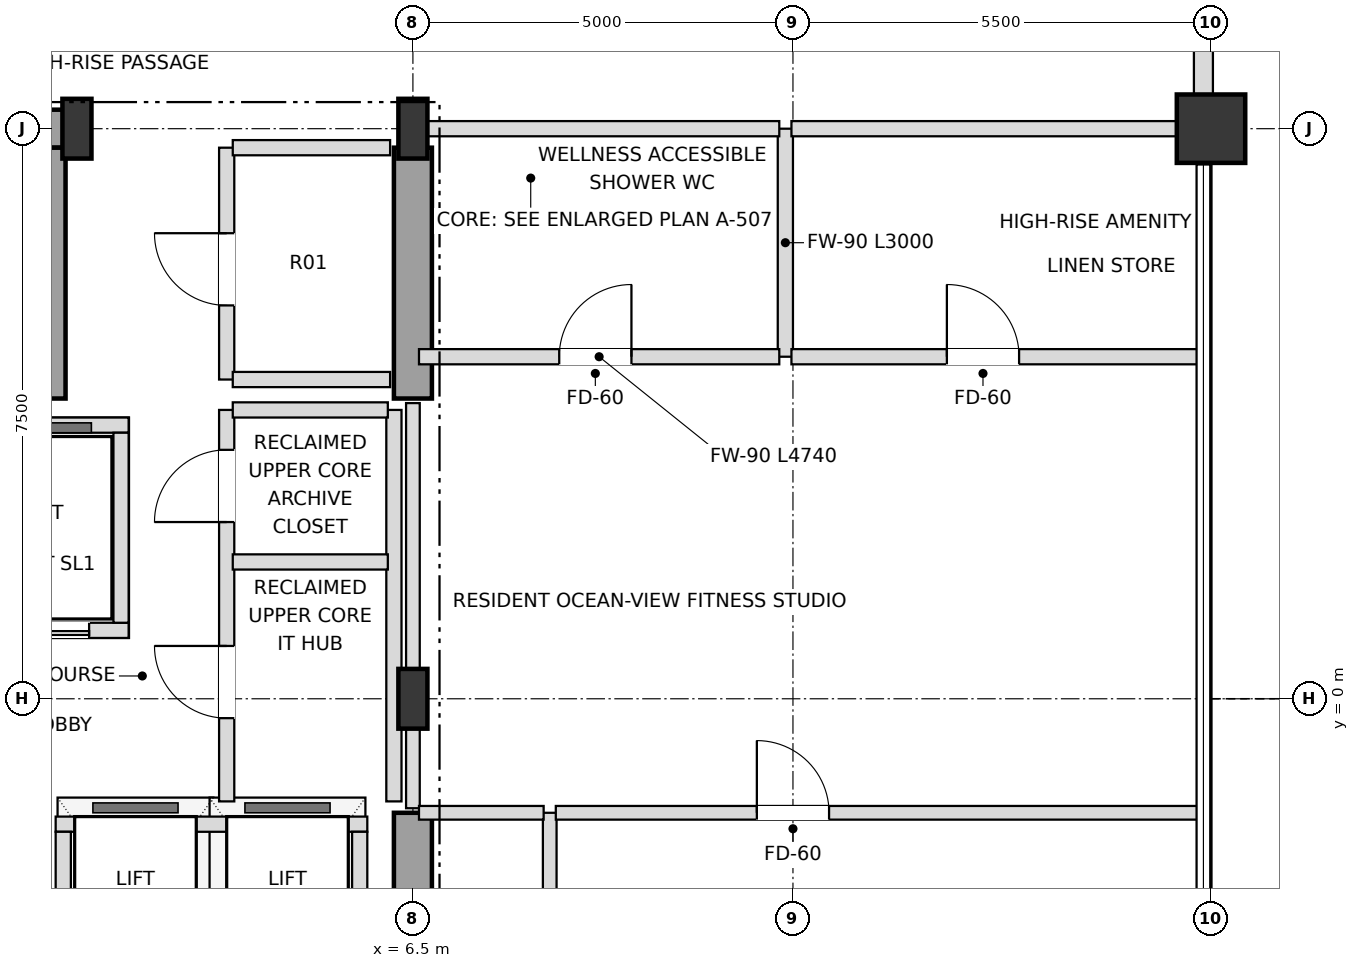
"""IFC4 building model, lengths in metres.
Left out: names, types, materials, properties, quantities, classifications, styles, units other than length and angle.
Written with IfcOpenShell. Run it as: python <this file> out.ifc"""

import sys

from ifc_helpers import new_model, si_unit, direction, frame, frame_2d, origin, origin_2d, place, context, subcontext, project, spatial, rectangle, i_section, extrude, element, fill, save


model = new_model("IFC4")
c1 = context("Model", 3, precision=1e-05, world=origin(), true_north=direction((0.0, 1.0)))
c2 = subcontext(c1, "Body", "Model", "MODEL_VIEW")
j1 = project(units=[si_unit("LENGTHUNIT", "METRE"), si_unit("PLANEANGLEUNIT", "RADIAN")], contexts=[c1])
p1 = place(None, origin())
s1 = spatial("IfcSite", under=j1, at=p1, CompositionType="ELEMENT")
p2 = place(p1, origin())
s2 = spatial("IfcBuilding", under=s1, at=p2, CompositionType="ELEMENT")
p3 = place(p2, frame((0.0, 0.0, 272.7)))
s3 = spatial("IfcBuildingStorey", under=s2, at=p3, CompositionType="ELEMENT", Elevation=272.7)
for number, where, z_axis, x_axis in (
    (1, (6.5, 0.0, 0.0), (0.0, 0.0, 1.0), (1.0, 0.0, 0.0)),
    (2, (2.08, 7.5, 0.0), (0.0, 0.0, 1.0), (1.0, 0.0, 0.0)),
    (3, (6.5, 7.5, 0.0), (0.0, 0.0, 1.0), (1.0, 0.0, 0.0)),
):
    element("IfcColumn", number, at=place(p3, frame(where, z_axis=z_axis, x_axis=x_axis)), inside=s3, PredefinedType="COLUMN", context=c2, shape_type="SweptSolid", body=[
        extrude(i_section(OverallWidth=0.382, OverallDepth=0.786, WebThickness=0.02, FlangeThickness=0.033, at=origin_2d()), origin(), (0.0, 0.0, 1.0), 3.6),
    ])
p4 = place(p3, frame((17.0, 7.5, 0.0), z_axis=(0.0, 0.0, 1.0), x_axis=(1.0, 0.0, 0.0)))
e4 = element("IfcColumn", 4, at=p4, inside=s3, PredefinedType="USERDEFINED", context=c2, shape_type="SweptSolid", body=[
    extrude(rectangle(XDim=0.9, YDim=0.9, at=origin_2d()), origin(), (0.0, 0.0, 1.0), 3.6),
])
p5 = place(p3, frame((16.9, 7.945, 0.0), z_axis=(0.0, 0.0, 1.0), x_axis=(0.0, 1.0, 0.0)))
e5 = element("IfcWall", 5, at=p5, inside=s3, PredefinedType="SOLIDWALL", context=c2, shape_type="SweptSolid", body=[
    extrude(rectangle(XDim=4.61, YDim=0.25, at=frame_2d((2.305, 0.0))), origin(), (0.0, 0.0, 1.0), 2.748),
])
p6 = place(p5, frame((1.405, 0.0, 0.72)))
e6 = element("IfcOpeningElement", 6, at=p6, cuts=e5, PredefinedType="OPENING", context=c2, shape_type="SweptSolid", body=[
    extrude(rectangle(XDim=1.8, YDim=1.68, at=frame_2d((0.9, 0.84))), frame((0.0, 0.135, 0.0), z_axis=(0.0, -1.0, 0.0), x_axis=(1.0, 0.0, 0.0)), (0.0, 0.0, 1.0), 0.27),
])
p7 = place(p3, frame((0.0, 7.5, 0.0), z_axis=(0.0, 0.0, 1.0), x_axis=(1.0, 0.0, 0.0)))
e7 = element("IfcWall", 7, at=p7, inside=s3, PredefinedType="SHEAR", context=c2, shape_type="SweptSolid", body=[
    extrude(rectangle(XDim=2.08, YDim=0.5, at=frame_2d((1.04, 0.0))), origin(), (0.0, 0.0, 1.0), 3.38),
])
p8 = place(p3, frame((6.5, -7.25, 0.0), z_axis=(0.0, 0.0, 1.0), x_axis=(0.0, 1.0, 0.0)))
e8 = element("IfcWall", 8, at=p8, inside=s3, PredefinedType="SHEAR", context=c2, shape_type="SweptSolid", body=[
    extrude(rectangle(XDim=5.75, YDim=0.5, at=frame_2d((2.875, 0.0))), origin(), (0.0, 0.0, 1.0), 3.38),
])
p9 = place(p8, frame((0.85, 0.0, 0.0)))
e9 = element("IfcOpeningElement", 9, at=p9, cuts=e8, PredefinedType="OPENING", context=c2, shape_type="SweptSolid", body=[
    extrude(rectangle(XDim=1.05, YDim=2.15, at=frame_2d((0.525, 1.075))), frame((0.0, 0.26, 0.0), z_axis=(0.0, -1.0, 0.0), x_axis=(1.0, 0.0, 0.0)), (0.0, 0.0, 1.0), 0.52),
])
p10 = place(p3, frame((6.5, 3.95, 0.0), z_axis=(0.0, 0.0, 1.0), x_axis=(0.0, 1.0, 0.0)))
e10 = element("IfcWall", 10, at=p10, inside=s3, PredefinedType="SHEAR", context=c2, shape_type="SweptSolid", body=[
    extrude(rectangle(XDim=3.3, YDim=0.5, at=frame_2d((1.65, 0.0))), origin(), (0.0, 0.0, 1.0), 3.38),
])
p11 = place(p3, frame((1.73, 3.95, 0.0), z_axis=(0.0, 0.0, 1.0), x_axis=(0.0, 1.0, 0.0)))
e11 = element("IfcWall", 11, at=p11, inside=s3, PredefinedType="SHEAR", context=c2, shape_type="SweptSolid", body=[
    extrude(rectangle(XDim=3.3, YDim=0.4, at=frame_2d((1.65, 0.0))), origin(), (0.0, 0.0, 1.0), 3.38),
])
p12 = place(p3, frame((-2.82, 0.9, 0.0), z_axis=(0.0, 0.0, 1.0), x_axis=(1.0, 0.0, 0.0)))
e12 = element("IfcWall", 12, at=p12, inside=s3, PredefinedType="SOLIDWALL", context=c2, shape_type="SweptSolid", body=[
    extrude(rectangle(XDim=5.58, YDim=0.2, at=frame_2d((2.79, 0.0))), origin(), (0.0, 0.0, 1.0), 3.38),
])
p13 = place(p12, frame((0.49, 0.0, 0.0)))
e13 = element("IfcOpeningElement", 13, at=p13, cuts=e12, PredefinedType="OPENING", context=c2, shape_type="SweptSolid", body=[
    extrude(rectangle(XDim=1.1, YDim=2.15, at=frame_2d((0.55, 1.075))), frame((0.0, 0.11, 0.0), z_axis=(0.0, -1.0, 0.0), x_axis=(1.0, 0.0, 0.0)), (0.0, 0.0, 1.0), 0.22),
])
p14 = place(p12, frame((2.17, 0.0, 0.0)))
e14 = element("IfcOpeningElement", 14, at=p14, cuts=e12, PredefinedType="OPENING", context=c2, shape_type="SweptSolid", body=[
    extrude(rectangle(XDim=1.1, YDim=2.15, at=frame_2d((0.55, 1.075))), frame((0.0, 0.11, 0.0), z_axis=(0.0, -1.0, 0.0), x_axis=(1.0, 0.0, 0.0)), (0.0, 0.0, 1.0), 0.22),
])
p15 = place(p12, frame((3.86, 0.0, 0.0)))
e15 = element("IfcOpeningElement", 15, at=p15, cuts=e12, PredefinedType="OPENING", context=c2, shape_type="SweptSolid", body=[
    extrude(rectangle(XDim=1.2, YDim=2.2, at=frame_2d((0.6, 1.1))), frame((0.0, 0.11, 0.0), z_axis=(0.0, -1.0, 0.0), x_axis=(1.0, 0.0, 0.0)), (0.0, 0.0, 1.0), 0.22),
])
p16 = place(p3, frame((-2.82, 3.6, 0.0), z_axis=(0.0, 0.0, 1.0), x_axis=(1.0, 0.0, 0.0)))
e16 = element("IfcWall", 16, at=p16, inside=s3, PredefinedType="SOLIDWALL", context=c2, shape_type="SweptSolid", body=[
    extrude(rectangle(XDim=5.58, YDim=0.2, at=frame_2d((2.79, 0.0))), origin(), (0.0, 0.0, 1.0), 3.38),
])
p17 = place(p3, frame((2.66, 1.0, 0.0), z_axis=(0.0, 0.0, 1.0), x_axis=(0.0, 1.0, 0.0)))
e17 = element("IfcWall", 17, at=p17, inside=s3, PredefinedType="SOLIDWALL", context=c2, shape_type="SweptSolid", body=[
    extrude(rectangle(XDim=2.5, YDim=0.2, at=frame_2d((1.25, 0.0))), origin(), (0.0, 0.0, 1.0), 3.38),
])
p18 = place(p3, frame((1.8, -1.65, 0.0), z_axis=(0.0, 0.0, 1.0), x_axis=(1.0, 0.0, 0.0)))
e18 = element("IfcWall", 18, at=p18, inside=s3, PredefinedType="SOLIDWALL", context=c2, shape_type="SweptSolid", body=[
    extrude(rectangle(XDim=4.1, YDim=0.2, at=frame_2d((2.05, 0.0))), origin(), (0.0, 0.0, 1.0), 3.38),
])
for number, where, z_axis, x_axis in (
    (19, (1.9, -3.75, 0.0), (0.0, 0.0, 1.0), (0.0, 1.0, 0.0)),
    (20, (5.8, -3.75, 0.0), (0.0, 0.0, 1.0), (0.0, 1.0, 0.0)),
):
    element("IfcWall", number, at=place(p3, frame(where, z_axis=z_axis, x_axis=x_axis)), inside=s3, PredefinedType="SOLIDWALL", context=c2, shape_type="SweptSolid", body=[
        extrude(rectangle(XDim=2.0, YDim=0.2, at=frame_2d((1.0, 0.0))), origin(), (0.0, 0.0, 1.0), 3.38),
    ])
p19 = place(p3, frame((4.05, -1.35, 0.0), z_axis=(0.0, 0.0, 1.0), x_axis=(0.0, 1.0, 0.0)))
e21 = element("IfcWall", 21, at=p19, inside=s3, PredefinedType="SOLIDWALL", context=c2, shape_type="SweptSolid", body=[
    extrude(rectangle(XDim=5.15, YDim=0.2, at=frame_2d((2.575, 0.0))), origin(), (0.0, 0.0, 1.0), 3.38),
])
p20 = place(p19, frame((1.095, 0.0, 0.0)))
e22 = element("IfcOpeningElement", 22, at=p20, cuts=e21, PredefinedType="OPENING", context=c2, shape_type="SweptSolid", body=[
    extrude(rectangle(XDim=0.95, YDim=2.15, at=frame_2d((0.475, 1.075))), frame((0.0, 0.11, 0.0), z_axis=(0.0, -1.0, 0.0), x_axis=(1.0, 0.0, 0.0)), (0.0, 0.0, 1.0), 0.22),
])
p21 = place(p19, frame((3.675, 0.0, 0.0)))
e23 = element("IfcOpeningElement", 23, at=p21, cuts=e21, PredefinedType="OPENING", context=c2, shape_type="SweptSolid", body=[
    extrude(rectangle(XDim=0.95, YDim=2.15, at=frame_2d((0.475, 1.075))), frame((0.0, 0.11, 0.0), z_axis=(0.0, -1.0, 0.0), x_axis=(1.0, 0.0, 0.0)), (0.0, 0.0, 1.0), 0.22),
])
p22 = place(p3, frame((4.05, 4.2, 0.0), z_axis=(0.0, 0.0, 1.0), x_axis=(0.0, 1.0, 0.0)))
e24 = element("IfcWall", 24, at=p22, inside=s3, PredefinedType="SOLIDWALL", context=c2, shape_type="SweptSolid", body=[
    extrude(rectangle(XDim=3.05, YDim=0.2, at=frame_2d((1.525, 0.0))), origin(), (0.0, 0.0, 1.0), 3.38),
])
p23 = place(p22, frame((0.975, 0.0, 0.0)))
e25 = element("IfcOpeningElement", 25, at=p23, cuts=e24, PredefinedType="OPENING", context=c2, shape_type="SweptSolid", body=[
    extrude(rectangle(XDim=0.95, YDim=2.15, at=frame_2d((0.475, 1.075))), frame((0.0, 0.11, 0.0), z_axis=(0.0, -1.0, 0.0), x_axis=(1.0, 0.0, 0.0)), (0.0, 0.0, 1.0), 0.22),
])
p24 = place(p3, frame((6.25, -1.35, 0.0), z_axis=(0.0, 0.0, 1.0), x_axis=(0.0, 1.0, 0.0)))
e26 = element("IfcWall", 26, at=p24, inside=s3, PredefinedType="SOLIDWALL", context=c2, shape_type="SweptSolid", body=[
    extrude(rectangle(XDim=5.15, YDim=0.2, at=frame_2d((2.575, 0.0))), origin(), (0.0, 0.0, 1.0), 3.38),
])
p25 = place(p3, frame((6.5, -1.44, 0.0), z_axis=(0.0, 0.0, 1.0), x_axis=(0.0, 1.0, 0.0)))
e27 = element("IfcWall", 27, at=p25, inside=s3, PredefinedType="PARTITIONING", context=c2, shape_type="SweptSolid", body=[
    extrude(rectangle(XDim=5.33, YDim=0.18, at=frame_2d((2.665, 0.0))), origin(), (0.0, 0.0, 1.0), 2.826),
])
p26 = place(p3, frame((8.3, -7.5, 0.0), z_axis=(0.0, 0.0, 1.0), x_axis=(0.0, 1.0, 0.0)))
e28 = element("IfcWall", 28, at=p26, inside=s3, PredefinedType="PARTITIONING", context=c2, shape_type="SweptSolid", body=[
    extrude(rectangle(XDim=6.0, YDim=0.18, at=frame_2d((3.0, 0.0))), origin(), (0.0, 0.0, 1.0), 3.38),
])
p27 = place(p26, frame((1.425, 0.0, 0.0)))
e29 = element("IfcOpeningElement", 29, at=p27, cuts=e28, PredefinedType="OPENING", context=c2, shape_type="SweptSolid", body=[
    extrude(rectangle(XDim=0.95, YDim=2.15, at=frame_2d((0.475, 1.075))), frame((0.0, 0.1, 0.0), z_axis=(0.0, -1.0, 0.0), x_axis=(1.0, 0.0, 0.0)), (0.0, 0.0, 1.0), 0.2),
])
p28 = place(p3, frame((11.4, 4.5, 0.0), z_axis=(0.0, 0.0, 1.0), x_axis=(0.0, 1.0, 0.0)))
e30 = element("IfcWall", 30, at=p28, inside=s3, PredefinedType="SOLIDWALL", context=c2, shape_type="SweptSolid", body=[
    extrude(rectangle(XDim=3.0, YDim=0.2, at=frame_2d((1.5, 0.0))), origin(), (0.0, 0.0, 1.0), 3.018),
])
p29 = place(p3, frame((6.58, -1.5, 0.0), z_axis=(0.0, 0.0, 1.0), x_axis=(1.0, 0.0, 0.0)))
e31 = element("IfcWall", 31, at=p29, inside=s3, PredefinedType="PARTITIONING", context=c2, shape_type="SweptSolid", body=[
    extrude(rectangle(XDim=1.64, YDim=0.18, at=frame_2d((0.82, 0.0))), origin(), (0.0, 0.0, 1.0), 3.38),
])
p30 = place(p3, frame((8.38, -1.5, 0.0), z_axis=(0.0, 0.0, 1.0), x_axis=(1.0, 0.0, 0.0)))
e32 = element("IfcWall", 32, at=p30, inside=s3, PredefinedType="PARTITIONING", context=c2, shape_type="SweptSolid", body=[
    extrude(rectangle(XDim=8.44, YDim=0.18, at=frame_2d((4.22, 0.0))), origin(), (0.0, 0.0, 1.0), 3.018),
])
p31 = place(p30, frame((2.645, 0.0, 0.0)))
e33 = element("IfcOpeningElement", 33, at=p31, cuts=e32, PredefinedType="OPENING", context=c2, shape_type="SweptSolid", body=[
    extrude(rectangle(XDim=0.95, YDim=2.15, at=frame_2d((0.475, 1.075))), frame((0.0, 0.1, 0.0), z_axis=(0.0, -1.0, 0.0), x_axis=(1.0, 0.0, 0.0)), (0.0, 0.0, 1.0), 0.2),
])
for number, where, z_axis, x_axis in (
    (34, (4.13, 1.8, 0.0), (0.0, 0.0, 1.0), (1.0, 0.0, 0.0)),
    (35, (4.13, 3.8, 0.0), (0.0, 0.0, 1.0), (1.0, 0.0, 0.0)),
):
    element("IfcWall", number, at=place(p3, frame(where, z_axis=z_axis, x_axis=x_axis)), inside=s3, PredefinedType="SOLIDWALL", context=c2, shape_type="SweptSolid", body=[
        extrude(rectangle(XDim=2.04, YDim=0.2, at=frame_2d((1.02, 0.0))), origin(), (0.0, 0.0, 1.0), 3.38),
    ])
p32 = place(p3, frame((4.13, 4.2, 0.0), z_axis=(0.0, 0.0, 1.0), x_axis=(1.0, 0.0, 0.0)))
e36 = element("IfcWall", 36, at=p32, inside=s3, PredefinedType="SOLIDWALL", context=c2, shape_type="SweptSolid", body=[
    extrude(rectangle(XDim=2.07, YDim=0.2, at=frame_2d((1.035, 0.0))), origin(), (0.0, 0.0, 1.0), 3.38),
])
p33 = place(p3, frame((6.58, 4.5, 0.0), z_axis=(0.0, 0.0, 1.0), x_axis=(1.0, 0.0, 0.0)))
e37 = element("IfcWall", 37, at=p33, inside=s3, PredefinedType="SOLIDWALL", context=c2, shape_type="SweptSolid", body=[
    extrude(rectangle(XDim=4.74, YDim=0.2, at=frame_2d((2.37, 0.0))), origin(), (0.0, 0.0, 1.0), 3.38),
])
p34 = place(p33, frame((1.845, 0.0, 0.0)))
e38 = element("IfcOpeningElement", 38, at=p34, cuts=e37, PredefinedType="OPENING", context=c2, shape_type="SweptSolid", body=[
    extrude(rectangle(XDim=0.95, YDim=2.15, at=frame_2d((0.475, 1.075))), frame((0.0, 0.11, 0.0), z_axis=(0.0, -1.0, 0.0), x_axis=(1.0, 0.0, 0.0)), (0.0, 0.0, 1.0), 0.22),
])
p35 = place(p3, frame((11.48, 4.5, 0.0), z_axis=(0.0, 0.0, 1.0), x_axis=(1.0, 0.0, 0.0)))
e39 = element("IfcWall", 39, at=p35, inside=s3, PredefinedType="SOLIDWALL", context=c2, shape_type="SweptSolid", body=[
    extrude(rectangle(XDim=5.34, YDim=0.2, at=frame_2d((2.67, 0.0))), origin(), (0.0, 0.0, 1.0), 3.38),
])
p36 = place(p35, frame((2.045, 0.0, 0.0)))
e40 = element("IfcOpeningElement", 40, at=p36, cuts=e39, PredefinedType="OPENING", context=c2, shape_type="SweptSolid", body=[
    extrude(rectangle(XDim=0.95, YDim=2.15, at=frame_2d((0.475, 1.075))), frame((0.0, 0.11, 0.0), z_axis=(0.0, -1.0, 0.0), x_axis=(1.0, 0.0, 0.0)), (0.0, 0.0, 1.0), 0.22),
])
p37 = place(p3, frame((4.13, 7.25, 0.0), z_axis=(0.0, 0.0, 1.0), x_axis=(1.0, 0.0, 0.0)))
e41 = element("IfcWall", 41, at=p37, inside=s3, PredefinedType="SOLIDWALL", context=c2, shape_type="SweptSolid", body=[
    extrude(rectangle(XDim=2.07, YDim=0.2, at=frame_2d((1.035, 0.0))), origin(), (0.0, 0.0, 1.0), 3.38),
])
p38 = place(p3, frame((6.5, 7.5, 0.0), z_axis=(0.0, 0.0, 1.0), x_axis=(1.0, 0.0, 0.0)))
e42 = element("IfcWall", 42, at=p38, inside=s3, PredefinedType="SOLIDWALL", context=c2, shape_type="SweptSolid", body=[
    extrude(rectangle(XDim=4.82, YDim=0.2, at=frame_2d((2.41, 0.0))), origin(), (0.0, 0.0, 1.0), 2.826),
])
p39 = place(p3, frame((11.48, 7.5, 0.0), z_axis=(0.0, 0.0, 1.0), x_axis=(1.0, 0.0, 0.0)))
e43 = element("IfcWall", 43, at=p39, inside=s3, PredefinedType="SOLIDWALL", context=c2, shape_type="SweptSolid", body=[
    extrude(rectangle(XDim=5.42, YDim=0.2, at=frame_2d((2.71, 0.0))), origin(), (0.0, 0.0, 1.0), 2.826),
])
p40 = place(p15, origin())
e44 = element("IfcDoor", 44, at=p40, inside=s3, OperationType="DOUBLE_DOOR_SLIDING", PredefinedType="DOOR", context=c2, shape_type="SweptSolid", body=[
    extrude(rectangle(XDim=1.2, YDim=2.2, at=frame_2d((0.6, 1.1))), frame((0.0, 0.025, 0.0), z_axis=(0.0, -1.0, 0.0), x_axis=(1.0, 0.0, 0.0)), (0.0, 0.0, 1.0), 0.05),
])
fill(e15, e44)
p41 = place(p20, origin())
e45 = element("IfcDoor", 45, at=p41, inside=s3, OperationType="SINGLE_SWING_RIGHT", PredefinedType="DOOR", context=c2, shape_type="SweptSolid", body=[
    extrude(rectangle(XDim=0.95, YDim=2.15, at=frame_2d((0.475, 1.075))), frame((0.0, 0.025, 0.0), z_axis=(0.0, -1.0, 0.0), x_axis=(1.0, 0.0, 0.0)), (0.0, 0.0, 1.0), 0.05),
])
fill(e22, e45)
p42 = place(p21, origin())
e46 = element("IfcDoor", 46, at=p42, inside=s3, OperationType="SINGLE_SWING_LEFT", PredefinedType="DOOR", context=c2, shape_type="SweptSolid", body=[
    extrude(rectangle(XDim=0.95, YDim=2.15, at=frame_2d((0.475, 1.075))), frame((0.0, 0.025, 0.0), z_axis=(0.0, -1.0, 0.0), x_axis=(1.0, 0.0, 0.0)), (0.0, 0.0, 1.0), 0.05),
])
fill(e23, e46)
p43 = place(p23, origin())
e47 = element("IfcDoor", 47, at=p43, inside=s3, OperationType="SINGLE_SWING_RIGHT", PredefinedType="DOOR", context=c2, shape_type="SweptSolid", body=[
    extrude(rectangle(XDim=0.95, YDim=2.15, at=frame_2d((0.475, 1.075))), frame((0.0, 0.025, 0.0), z_axis=(0.0, -1.0, 0.0), x_axis=(1.0, 0.0, 0.0)), (0.0, 0.0, 1.0), 0.05),
])
fill(e25, e47)
p44 = place(p31, origin())
e48 = element("IfcDoor", 48, at=p44, inside=s3, OperationType="SINGLE_SWING_LEFT", PredefinedType="DOOR", context=c2, shape_type="SweptSolid", body=[
    extrude(rectangle(XDim=0.95, YDim=2.15, at=frame_2d((0.475, 1.075))), frame((0.0, 0.025, 0.0), z_axis=(0.0, -1.0, 0.0), x_axis=(1.0, 0.0, 0.0)), (0.0, 0.0, 1.0), 0.05),
])
fill(e33, e48)
p45 = place(p34, origin())
e49 = element("IfcDoor", 49, at=p45, inside=s3, OperationType="SINGLE_SWING_RIGHT", PredefinedType="DOOR", context=c2, shape_type="SweptSolid", body=[
    extrude(rectangle(XDim=0.95, YDim=2.15, at=frame_2d((0.475, 1.075))), frame((0.0, 0.025, 0.0), z_axis=(0.0, -1.0, 0.0), x_axis=(1.0, 0.0, 0.0)), (0.0, 0.0, 1.0), 0.05),
])
fill(e38, e49)
p46 = place(p36, origin())
e50 = element("IfcDoor", 50, at=p46, inside=s3, OperationType="SINGLE_SWING_LEFT", PredefinedType="DOOR", context=c2, shape_type="SweptSolid", body=[
    extrude(rectangle(XDim=0.95, YDim=2.15, at=frame_2d((0.475, 1.075))), frame((0.0, 0.025, 0.0), z_axis=(0.0, -1.0, 0.0), x_axis=(1.0, 0.0, 0.0)), (0.0, 0.0, 1.0), 0.05),
])
fill(e40, e50)
save(model, sys.argv[1])
